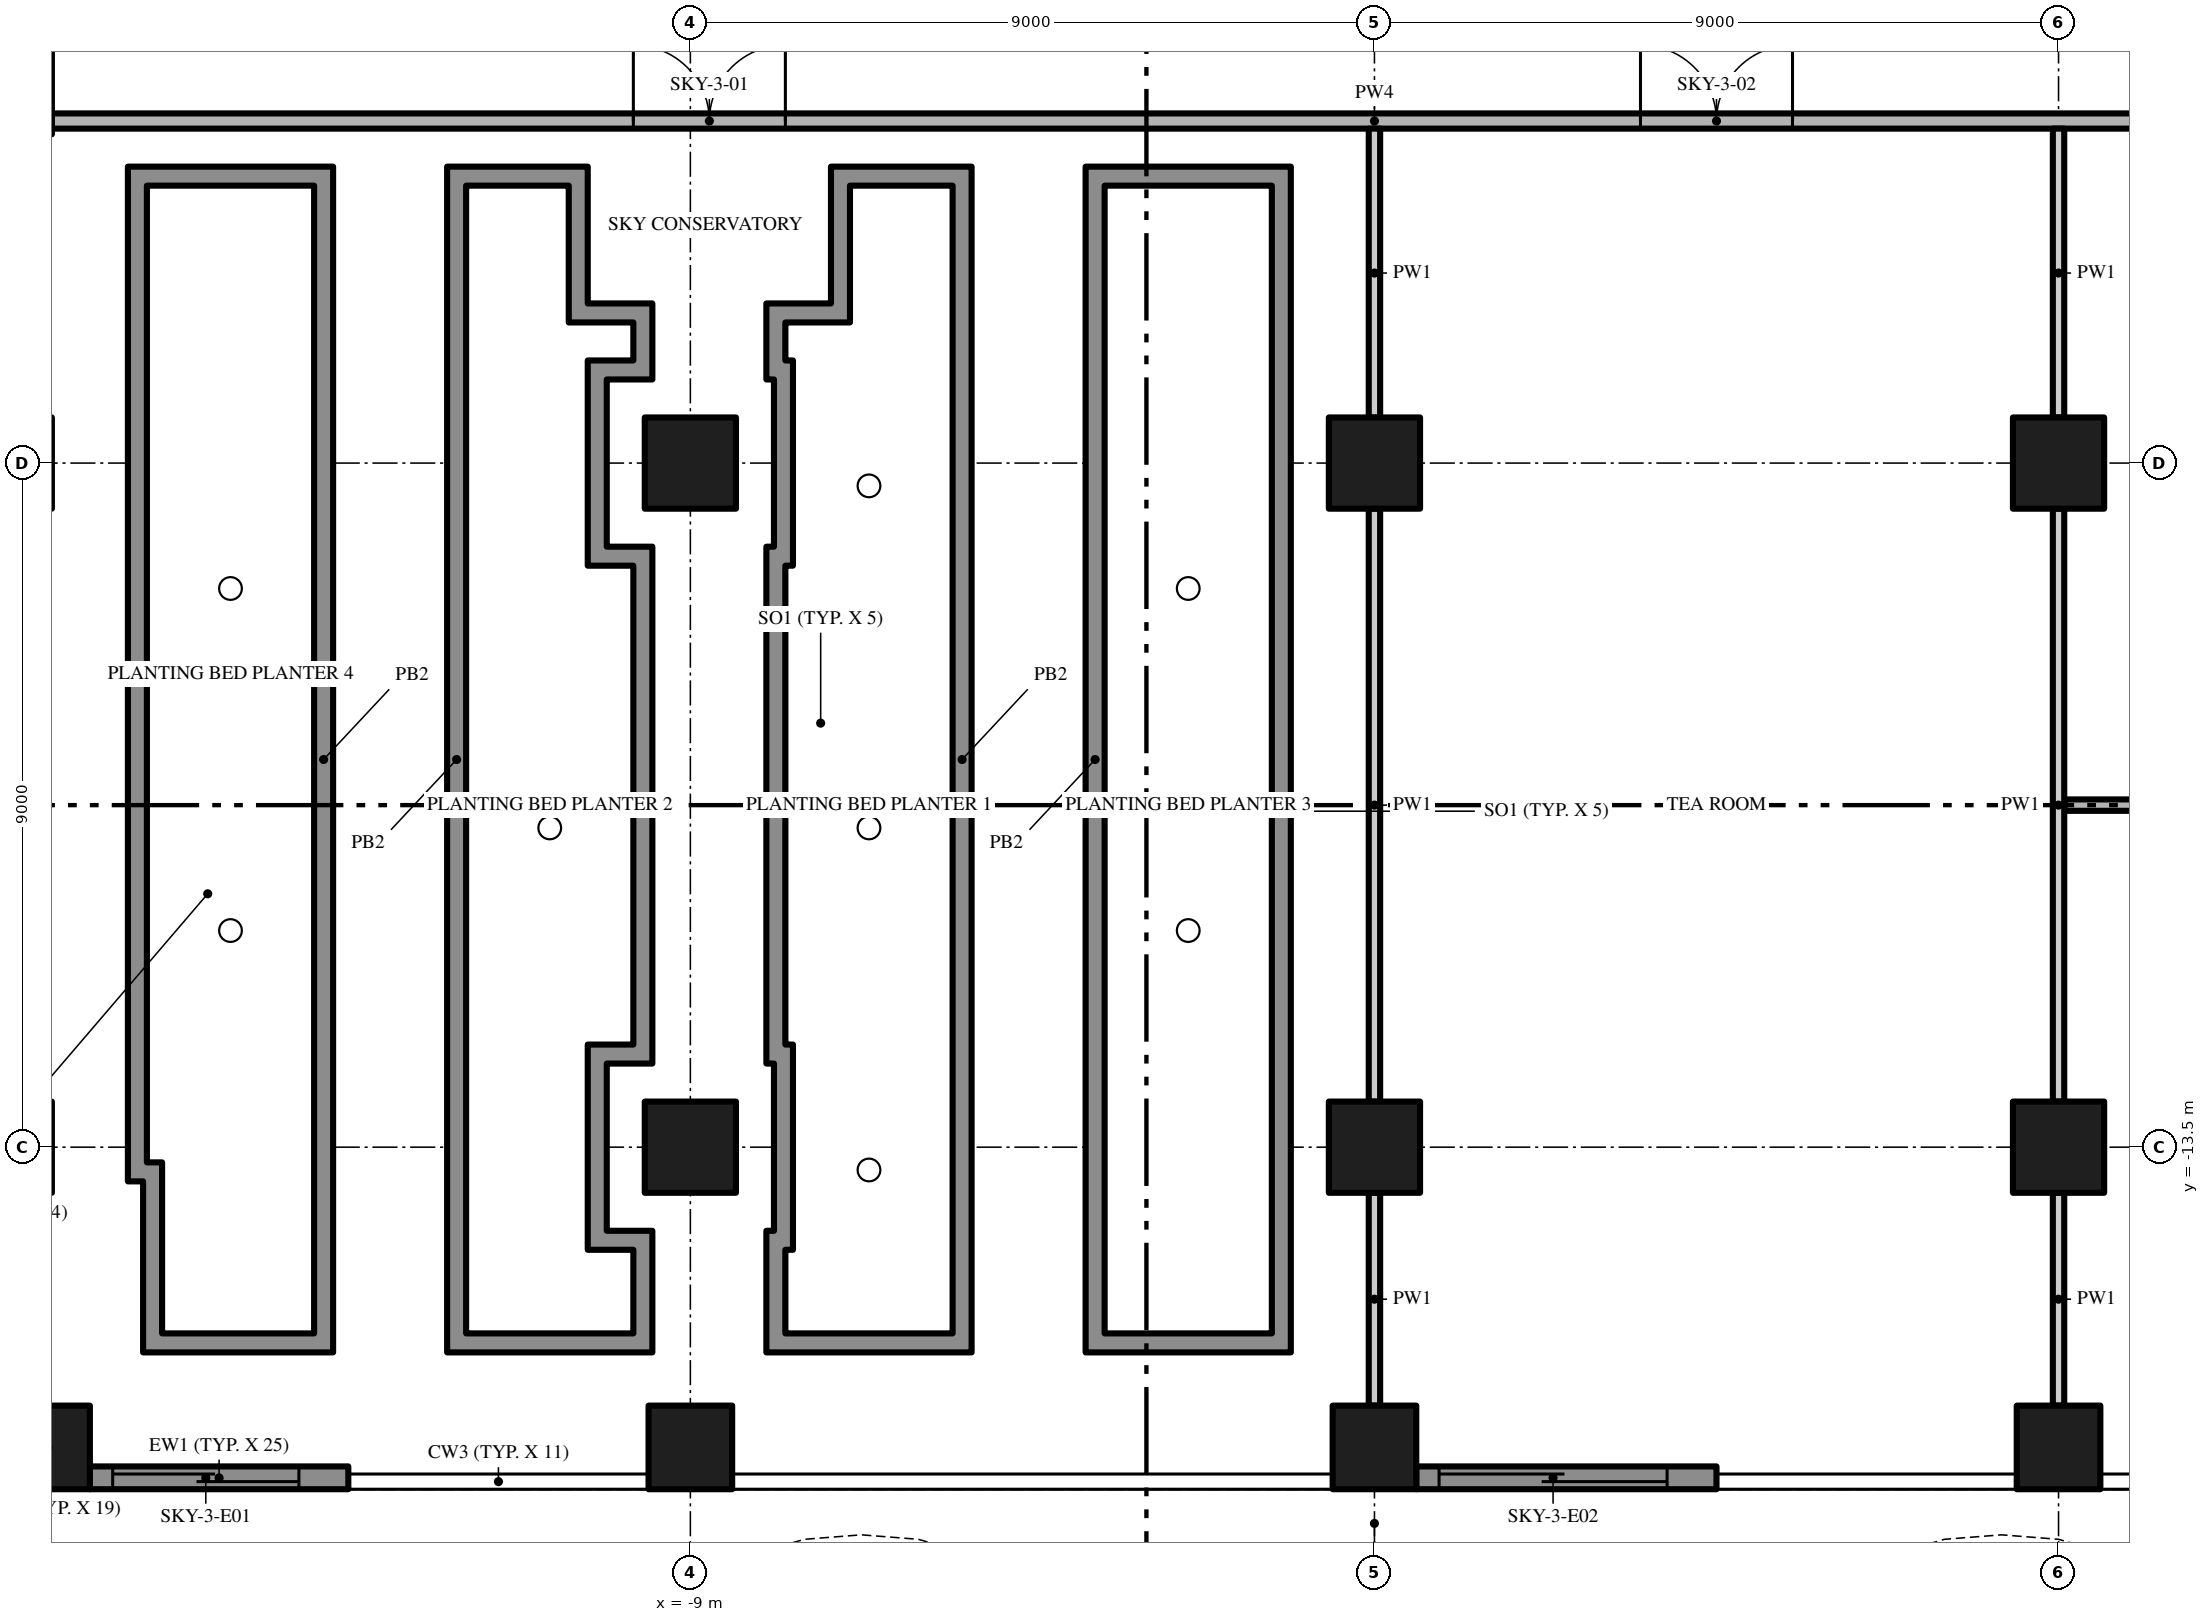
"""IFC4 building model, lengths in metres.
Left out: names, types, materials, properties, quantities, classifications, styles, units other than length and angle.
Written with IfcOpenShell. Run it as: python <this file> out.ifc"""

import sys

from ifc_helpers import new_model, si_unit, direction, frame, frame_2d, origin, origin_2d, place, context, subcontext, project, spatial, polyline, rectangle, outline, extrude, element, fill, save


model = new_model("IFC4")
c1 = context("Model", 3, precision=1e-05, world=origin(), true_north=direction((0.0, 1.0)))
c2 = subcontext(c1, "Body", "Model", "MODEL_VIEW")
j1 = project(units=[si_unit("LENGTHUNIT", "METRE"), si_unit("PLANEANGLEUNIT", "RADIAN")], contexts=[c1])
p1 = place(None, origin())
s1 = spatial("IfcSite", under=j1, at=p1, CompositionType="ELEMENT")
p2 = place(p1, origin())
s2 = spatial("IfcBuilding", under=s1, at=p2, CompositionType="ELEMENT")
p3 = place(p2, frame((0.0, 0.0, 174.4)))
s3 = spatial("IfcBuildingStorey", under=s2, at=p3, CompositionType="ELEMENT", Elevation=174.4)
p4 = place(p3, frame((-17.45, -17.45, 0.0), z_axis=(0.0, 0.0, 1.0), x_axis=(1.0, 0.0, 0.0)))
e1 = element("IfcColumn", 1, at=p4, inside=s3, PredefinedType="COLUMN", context=c2, shape_type="SweptSolid", body=[
    extrude(rectangle(XDim=1.1, YDim=1.1, at=origin_2d()), origin(), (0.0, 0.0, 1.0), 4.7),
])
p5 = place(p3, frame((-9.0, -13.5, 0.0), z_axis=(0.0, 0.0, 1.0), x_axis=(1.0, 0.0, 0.0)))
e2 = element("IfcColumn", 2, at=p5, inside=s3, PredefinedType="COLUMN", context=c2, shape_type="SweptSolid", body=[
    extrude(rectangle(XDim=1.2, YDim=1.2, at=origin_2d()), origin(), (0.0, 0.0, 1.0), 4.7),
])
p6 = place(p3, frame((-9.0, -17.45, 0.0), z_axis=(0.0, 0.0, 1.0), x_axis=(1.0, 0.0, 0.0)))
e3 = element("IfcColumn", 3, at=p6, inside=s3, PredefinedType="COLUMN", context=c2, shape_type="SweptSolid", body=[
    extrude(rectangle(XDim=1.1, YDim=1.1, at=origin_2d()), origin(), (0.0, 0.0, 1.0), 4.7),
])
for number, where, z_axis, x_axis in (
    (4, (-9.0, -4.5, 0.0), (0.0, 0.0, 1.0), (1.0, 0.0, 0.0)),
    (5, (0.0, -13.5, 0.0), (0.0, 0.0, 1.0), (1.0, 0.0, 0.0)),
):
    element("IfcColumn", number, at=place(p3, frame(where, z_axis=z_axis, x_axis=x_axis)), inside=s3, PredefinedType="COLUMN", context=c2, shape_type="SweptSolid", body=[
        extrude(rectangle(XDim=1.2, YDim=1.2, at=origin_2d()), origin(), (0.0, 0.0, 1.0), 4.7),
    ])
p7 = place(p3, frame((0.0, -17.45, 0.0), z_axis=(0.0, 0.0, 1.0), x_axis=(1.0, 0.0, 0.0)))
e6 = element("IfcColumn", 6, at=p7, inside=s3, PredefinedType="COLUMN", context=c2, shape_type="SweptSolid", body=[
    extrude(rectangle(XDim=1.1, YDim=1.1, at=origin_2d()), origin(), (0.0, 0.0, 1.0), 4.7),
])
for number, where, z_axis, x_axis in (
    (7, (0.0, -4.5, 0.0), (0.0, 0.0, 1.0), (1.0, 0.0, 0.0)),
    (8, (9.0, -13.5, 0.0), (0.0, 0.0, 1.0), (1.0, 0.0, 0.0)),
):
    element("IfcColumn", number, at=place(p3, frame(where, z_axis=z_axis, x_axis=x_axis)), inside=s3, PredefinedType="COLUMN", context=c2, shape_type="SweptSolid", body=[
        extrude(rectangle(XDim=1.2, YDim=1.2, at=origin_2d()), origin(), (0.0, 0.0, 1.0), 4.7),
    ])
p8 = place(p3, frame((9.0, -17.45, 0.0), z_axis=(0.0, 0.0, 1.0), x_axis=(1.0, 0.0, 0.0)))
e9 = element("IfcColumn", 9, at=p8, inside=s3, PredefinedType="COLUMN", context=c2, shape_type="SweptSolid", body=[
    extrude(rectangle(XDim=1.1, YDim=1.1, at=origin_2d()), origin(), (0.0, 0.0, 1.0), 4.7),
])
p9 = place(p3, frame((9.0, -4.5, 0.0), z_axis=(0.0, 0.0, 1.0), x_axis=(1.0, 0.0, 0.0)))
e10 = element("IfcColumn", 10, at=p9, inside=s3, PredefinedType="COLUMN", context=c2, shape_type="SweptSolid", body=[
    extrude(rectangle(XDim=1.2, YDim=1.2, at=origin_2d()), origin(), (0.0, 0.0, 1.0), 4.7),
])
p10 = place(p3, frame((-13.5, -17.85, 0.0), z_axis=(0.0, 0.0, 1.0), x_axis=(-1.0, 0.0, 0.0)))
e11 = element("IfcWall", 11, at=p10, inside=s3, PredefinedType="SOLIDWALL", context=c2, shape_type="SweptSolid", body=[
    extrude(rectangle(XDim=3.4, YDim=0.3, at=frame_2d((1.7, 0.0))), origin(), (0.0, 0.0, 1.0), 4.7),
])
p11 = place(p10, frame((0.65, 0.0, 0.0)))
e12 = element("IfcOpeningElement", 12, at=p11, cuts=e11, PredefinedType="OPENING", context=c2, shape_type="SweptSolid", body=[
    extrude(rectangle(XDim=2.45, YDim=2.4, at=frame_2d((1.225, 1.2))), frame((0.0, 0.16, 0.0), z_axis=(0.0, -1.0, 0.0), x_axis=(1.0, 0.0, 0.0)), (0.0, 0.0, 1.0), 0.32),
])
p12 = place(p3, frame((4.5, -17.85, 0.0), z_axis=(0.0, 0.0, 1.0), x_axis=(-1.0, 0.0, 0.0)))
e13 = element("IfcWall", 13, at=p12, inside=s3, PredefinedType="SOLIDWALL", context=c2, shape_type="SweptSolid", body=[
    extrude(rectangle(XDim=3.95, YDim=0.3, at=frame_2d((1.975, 0.0))), origin(), (0.0, 0.0, 1.0), 4.7),
])
p13 = place(p12, frame((0.65, 0.0, 0.0)))
e14 = element("IfcOpeningElement", 14, at=p13, cuts=e13, PredefinedType="OPENING", context=c2, shape_type="SweptSolid", body=[
    extrude(rectangle(XDim=3.0, YDim=2.4, at=frame_2d((1.5, 1.2))), frame((0.0, 0.16, 0.0), z_axis=(0.0, -1.0, 0.0), x_axis=(1.0, 0.0, 0.0)), (0.0, 0.0, 1.0), 0.32),
])
p14 = place(p3, origin())
e15 = element("IfcWall", 15, at=p14, inside=s3, PredefinedType="USERDEFINED", context=c2, shape_type="SweptSolid", body=[
    extrude(outline(polyline([(-18.0, -19.8), (-16.5, -20.505), (-15.0, -20.941), (-14.25, -21.0), (-13.5, -20.941), (-12.0, -20.505), (-10.5, -19.8), (-9.0, -19.095), (-7.5, -18.659), (-6.75, -18.6), (-6.0, -18.659), (-4.5, -19.095), (-3.0, -19.8), (-1.5, -20.505), (0.0, -20.941), (0.75, -21.0), (1.5, -20.941), (3.0, -20.505), (4.5, -19.8), (6.0, -19.095), (7.5, -18.659), (8.25, -18.6), (9.0, -18.659), (10.5, -19.095), (12.0, -19.8), (13.5, -20.505), (15.0, -20.941), (15.75, -21.0), (16.5, -20.941), (18.0, -20.505), (17.93, -20.265), (16.455, -20.694), (15.75, -20.749), (15.045, -20.694), (13.589, -20.271), (12.106, -19.574), (10.589, -18.86), (9.045, -18.411), (8.25, -18.349), (7.455, -18.411), (5.911, -18.86), (4.394, -19.574), (2.911, -20.271), (1.455, -20.694), (0.75, -20.749), (0.045, -20.694), (-1.411, -20.271), (-2.894, -19.574), (-4.411, -18.86), (-5.955, -18.411), (-6.75, -18.349), (-7.545, -18.411), (-9.089, -18.86), (-10.606, -19.574), (-12.089, -20.271), (-13.545, -20.694), (-14.25, -20.749), (-14.955, -20.694), (-16.411, -20.271), (-17.894, -19.574), (-18.0, -19.8)])), origin(), (0.0, 0.0, 1.0), 0.9),
])
p15 = place(p3, frame((9.075, -9.0, 0.0), z_axis=(0.0, 0.0, 1.0), x_axis=(1.0, 0.0, 0.0)))
e16 = element("IfcWall", 16, at=p15, inside=s3, PredefinedType="PARTITIONING", context=c2, shape_type="SweptSolid", body=[
    extrude(rectangle(XDim=13.125, YDim=0.15, at=frame_2d((6.562, 0.0))), origin(), (0.0, 0.0, 1.0), 4.7),
])
p16 = place(p15, frame((5.75, 0.0, 0.0)))
e17 = element("IfcOpeningElement", 17, at=p16, cuts=e16, PredefinedType="OPENING", context=c2, shape_type="SweptSolid", body=[
    extrude(rectangle(XDim=1.8, YDim=2.4, at=frame_2d((0.9, 1.2))), frame((0.0, 0.085, 0.0), z_axis=(0.0, -1.0, 0.0), x_axis=(1.0, 0.0, 0.0)), (0.0, 0.0, 1.0), 0.17),
])
p17 = place(p3, frame((-17.4, 0.0, 0.0), z_axis=(0.0, 0.0, 1.0), x_axis=(1.0, 0.0, 0.0)))
e18 = element("IfcWall", 18, at=p17, inside=s3, PredefinedType="PARTITIONING", context=c2, shape_type="SweptSolid", body=[
    extrude(rectangle(XDim=34.8, YDim=0.2, at=frame_2d((17.4, 0.0))), origin(), (0.0, 0.0, 1.0), 4.7),
])
p18 = place(p17, frame((7.65, 0.0, 0.0)))
e19 = element("IfcOpeningElement", 19, at=p18, cuts=e18, PredefinedType="OPENING", context=c2, shape_type="SweptSolid", body=[
    extrude(rectangle(XDim=2.0, YDim=2.4, at=frame_2d((1.0, 1.2))), frame((0.0, 0.11, 0.0), z_axis=(0.0, -1.0, 0.0), x_axis=(1.0, 0.0, 0.0)), (0.0, 0.0, 1.0), 0.22),
])
p19 = place(p17, frame((20.9, 0.0, 0.0)))
e20 = element("IfcOpeningElement", 20, at=p19, cuts=e18, PredefinedType="OPENING", context=c2, shape_type="SweptSolid", body=[
    extrude(rectangle(XDim=2.0, YDim=2.4, at=frame_2d((1.0, 1.2))), frame((0.0, 0.11, 0.0), z_axis=(0.0, -1.0, 0.0), x_axis=(1.0, 0.0, 0.0)), (0.0, 0.0, 1.0), 0.22),
])
p20 = place(p17, frame((29.65, 0.0, 0.0)))
e21 = element("IfcOpeningElement", 21, at=p20, cuts=e18, PredefinedType="OPENING", context=c2, shape_type="SweptSolid", body=[
    extrude(rectangle(XDim=2.0, YDim=2.4, at=frame_2d((1.0, 1.2))), frame((0.0, 0.11, 0.0), z_axis=(0.0, -1.0, 0.0), x_axis=(1.0, 0.0, 0.0)), (0.0, 0.0, 1.0), 0.22),
])
p21 = place(p3, frame((0.0, -16.9, 0.0), z_axis=(0.0, 0.0, 1.0), x_axis=(0.0, 1.0, 0.0)))
e22 = element("IfcWall", 22, at=p21, inside=s3, PredefinedType="PARTITIONING", context=c2, shape_type="SweptSolid", body=[
    extrude(rectangle(XDim=2.8, YDim=0.15, at=frame_2d((1.4, 0.0))), origin(), (0.0, 0.0, 1.0), 4.7),
])
p22 = place(p3, frame((0.0, -12.9, 0.0), z_axis=(0.0, 0.0, 1.0), x_axis=(0.0, 1.0, 0.0)))
e23 = element("IfcWall", 23, at=p22, inside=s3, PredefinedType="PARTITIONING", context=c2, shape_type="SweptSolid", body=[
    extrude(rectangle(XDim=7.8, YDim=0.15, at=frame_2d((3.9, 0.0))), origin(), (0.0, 0.0, 1.0), 4.7),
])
p23 = place(p3, frame((0.0, -3.9, 0.0), z_axis=(0.0, 0.0, 1.0), x_axis=(0.0, 1.0, 0.0)))
e24 = element("IfcWall", 24, at=p23, inside=s3, PredefinedType="PARTITIONING", context=c2, shape_type="SweptSolid", body=[
    extrude(rectangle(XDim=3.8, YDim=0.15, at=frame_2d((1.9, 0.0))), origin(), (0.0, 0.0, 1.0), 4.7),
])
p24 = place(p3, frame((9.0, -16.9, 0.0), z_axis=(0.0, 0.0, 1.0), x_axis=(0.0, 1.0, 0.0)))
e25 = element("IfcWall", 25, at=p24, inside=s3, PredefinedType="PARTITIONING", context=c2, shape_type="SweptSolid", body=[
    extrude(rectangle(XDim=2.8, YDim=0.15, at=frame_2d((1.4, 0.0))), origin(), (0.0, 0.0, 1.0), 4.7),
])
p25 = place(p3, frame((9.0, -12.9, 0.0), z_axis=(0.0, 0.0, 1.0), x_axis=(0.0, 1.0, 0.0)))
e26 = element("IfcWall", 26, at=p25, inside=s3, PredefinedType="PARTITIONING", context=c2, shape_type="SweptSolid", body=[
    extrude(rectangle(XDim=7.8, YDim=0.15, at=frame_2d((3.9, 0.0))), origin(), (0.0, 0.0, 1.0), 4.7),
])
p26 = place(p3, frame((9.0, -3.9, 0.0), z_axis=(0.0, 0.0, 1.0), x_axis=(0.0, 1.0, 0.0)))
e27 = element("IfcWall", 27, at=p26, inside=s3, PredefinedType="PARTITIONING", context=c2, shape_type="SweptSolid", body=[
    extrude(rectangle(XDim=3.8, YDim=0.15, at=frame_2d((1.9, 0.0))), origin(), (0.0, 0.0, 1.0), 4.7),
])
p27 = place(p3, origin())
e28 = element("IfcWall", 28, at=p27, inside=s3, PredefinedType="USERDEFINED", context=c2, shape_type="SweptSolid", body=[
    extrude(outline(polyline([(-5.3, -16.2), (-5.3, -0.6), (-7.15, -0.6), (-7.15, -2.4), (-8.0, -2.4), (-8.0, -3.4), (-7.9, -3.4), (-7.9, -5.6), (-8.0, -5.6), (-8.0, -12.4), (-7.9, -12.4), (-7.9, -14.6), (-8.0, -14.6), (-8.0, -16.2), (-5.3, -16.2)]), holes=[polyline([(-7.75, -15.95), (-7.75, -14.85), (-7.65, -14.85), (-7.65, -12.15), (-7.75, -12.15), (-7.75, -5.85), (-7.65, -5.85), (-7.65, -3.15), (-7.75, -3.15), (-7.75, -2.65), (-6.9, -2.65), (-6.9, -0.85), (-5.55, -0.85), (-5.55, -15.95), (-7.75, -15.95)])]), origin(), (0.0, 0.0, 1.0), 0.9),
])
p28 = place(p3, origin())
e29 = element("IfcWall", 29, at=p28, inside=s3, PredefinedType="USERDEFINED", context=c2, shape_type="SweptSolid", body=[
    extrude(outline(polyline([(-9.5, -16.2), (-9.5, -14.6), (-10.1, -14.6), (-10.1, -12.4), (-9.5, -12.4), (-9.5, -5.6), (-10.1, -5.6), (-10.1, -3.4), (-9.5, -3.4), (-9.5, -2.4), (-10.35, -2.4), (-10.35, -0.6), (-12.2, -0.6), (-12.2, -16.2), (-9.5, -16.2)]), holes=[polyline([(-11.95, -15.95), (-11.95, -0.85), (-10.6, -0.85), (-10.6, -2.65), (-9.75, -2.65), (-9.75, -3.15), (-10.35, -3.15), (-10.35, -5.85), (-9.75, -5.85), (-9.75, -12.15), (-10.35, -12.15), (-10.35, -14.85), (-9.75, -14.85), (-9.75, -15.95), (-11.95, -15.95)])]), origin(), (0.0, 0.0, 1.0), 0.9),
])
p29 = place(p3, origin())
e30 = element("IfcWall", 30, at=p29, inside=s3, PredefinedType="USERDEFINED", context=c2, shape_type="SweptSolid", body=[
    extrude(outline(polyline([(-1.1, -16.2), (-1.1, -14.6), (-1.1, -12.4), (-1.1, -5.6), (-1.1, -3.4), (-1.1, -0.6), (-3.8, -0.6), (-3.8, -16.2), (-1.1, -16.2)]), holes=[polyline([(-3.55, -15.95), (-3.55, -0.85), (-1.35, -0.85), (-1.35, -3.4), (-1.35, -5.6), (-1.35, -12.4), (-1.35, -14.6), (-1.35, -15.95), (-3.55, -15.95)])]), origin(), (0.0, 0.0, 1.0), 0.9),
])
p30 = place(p3, origin())
e31 = element("IfcWall", 31, at=p30, inside=s3, PredefinedType="USERDEFINED", context=c2, shape_type="SweptSolid", body=[
    extrude(outline(polyline([(-13.7, -16.2), (-13.7, -0.6), (-16.4, -0.6), (-16.4, -13.95), (-16.2, -13.95), (-16.2, -16.2), (-13.7, -16.2)]), holes=[polyline([(-15.95, -15.95), (-15.95, -13.7), (-16.15, -13.7), (-16.15, -0.85), (-13.95, -0.85), (-13.95, -15.95), (-15.95, -15.95)])]), origin(), (0.0, 0.0, 1.0), 0.9),
])
p31 = place(p11, origin())
e32 = element("IfcDoor", 32, at=p31, inside=s3, OperationType="SINGLE_SWING_LEFT", PredefinedType="DOOR", context=c2, shape_type="SweptSolid", body=[
    extrude(rectangle(XDim=2.45, YDim=2.4, at=frame_2d((1.225, 1.2))), frame((0.0, 0.025, 0.0), z_axis=(0.0, -1.0, 0.0), x_axis=(1.0, 0.0, 0.0)), (0.0, 0.0, 1.0), 0.05),
])
fill(e12, e32)
p32 = place(p13, origin())
e33 = element("IfcDoor", 33, at=p32, inside=s3, OperationType="SINGLE_SWING_LEFT", PredefinedType="DOOR", context=c2, shape_type="SweptSolid", body=[
    extrude(rectangle(XDim=3.0, YDim=2.4, at=frame_2d((1.5, 1.2))), frame((0.0, 0.025, 0.0), z_axis=(0.0, -1.0, 0.0), x_axis=(1.0, 0.0, 0.0)), (0.0, 0.0, 1.0), 0.05),
])
fill(e14, e33)
p33 = place(p18, origin())
e34 = element("IfcDoor", 34, at=p33, inside=s3, OperationType="DOUBLE_DOOR_SINGLE_SWING", PredefinedType="DOOR", context=c2, shape_type="SweptSolid", body=[
    extrude(rectangle(XDim=2.0, YDim=2.4, at=frame_2d((1.0, 1.2))), frame((0.0, 0.025, 0.0), z_axis=(0.0, -1.0, 0.0), x_axis=(1.0, 0.0, 0.0)), (0.0, 0.0, 1.0), 0.05),
])
fill(e19, e34)
p34 = place(p19, origin())
e35 = element("IfcDoor", 35, at=p34, inside=s3, OperationType="DOUBLE_DOOR_SINGLE_SWING", PredefinedType="DOOR", context=c2, shape_type="SweptSolid", body=[
    extrude(rectangle(XDim=2.0, YDim=2.4, at=frame_2d((1.0, 1.2))), frame((0.0, 0.025, 0.0), z_axis=(0.0, -1.0, 0.0), x_axis=(1.0, 0.0, 0.0)), (0.0, 0.0, 1.0), 0.05),
])
fill(e20, e35)
save(model, sys.argv[1])
